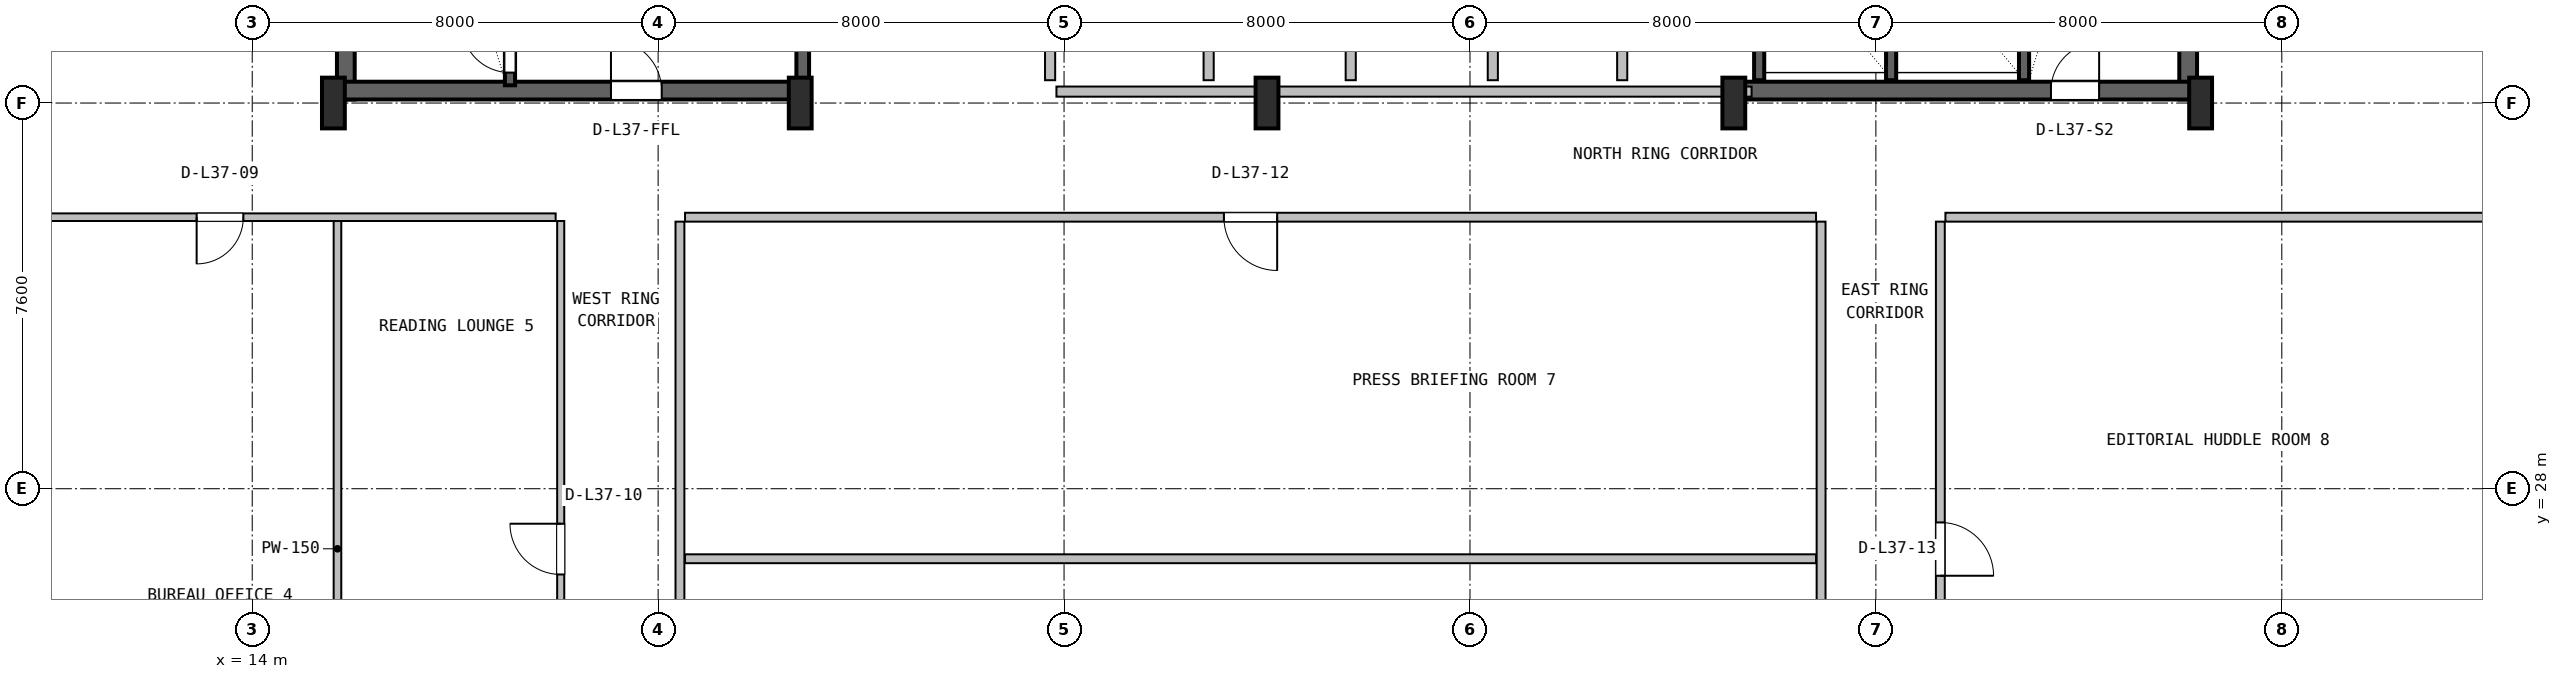
"""IFC4 building model, lengths in metres.
Left out: names, types, materials, properties, quantities, classifications, styles, units other than length and angle.
Written with IfcOpenShell. Run it as: python <this file> out.ifc"""

import sys

from ifc_helpers import new_model, si_unit, direction, frame, frame_2d, origin, origin_2d, place, context, subcontext, project, spatial, rectangle, i_section, extrude, source, transform, mapped, element, fill, save


model = new_model("IFC4")
c1 = context("Model", 3, precision=1e-05, world=origin(), true_north=direction((0.0, 1.0)))
c2 = subcontext(c1, "Body", "Model", "MODEL_VIEW")
j1 = project(units=[si_unit("LENGTHUNIT", "METRE"), si_unit("PLANEANGLEUNIT", "RADIAN")], contexts=[c1])
p1 = place(None, origin())
s1 = spatial("IfcSite", under=j1, at=p1, CompositionType="ELEMENT")
p2 = place(p1, origin())
s2 = spatial("IfcBuilding", under=s1, at=p2, CompositionType="ELEMENT")
p3 = place(p2, frame((0.0, 0.0, 153.4)))
s3 = spatial("IfcBuildingStorey", under=s2, at=p3, CompositionType="ELEMENT", Elevation=153.4)
for number, where, z_axis, x_axis in (
    (1, (15.845, 35.67, 0.0), (0.0, 0.0, 1.0), (0.0, 1.0, 0.0)),
    (2, (52.155, 35.67, 0.0), (0.0, 0.0, 1.0), (0.0, 1.0, 0.0)),
):
    element("IfcWall", number, at=place(p3, frame(where, z_axis=z_axis, x_axis=x_axis)), inside=s3, PredefinedType="SHEAR", context=c2, shape_type="SweptSolid", body=[
        extrude(rectangle(XDim=11.13, YDim=0.35, at=frame_2d((5.565, 0.0))), origin(), (0.0, 0.0, 1.0), 3.55),
    ])
p4 = place(p3, frame((15.67, 35.845, 0.0), z_axis=(0.0, 0.0, 1.0), x_axis=(1.0, 0.0, 0.0)))
e3 = element("IfcWall", 3, at=p4, inside=s3, PredefinedType="SHEAR", context=c2, shape_type="SweptSolid", body=[
    extrude(rectangle(XDim=9.13, YDim=0.35, at=frame_2d((4.565, 0.0))), origin(), (0.0, 0.0, 1.0), 3.55),
])
p5 = place(p4, frame((5.4, 0.0, 0.0)))
e4 = element("IfcOpeningElement", 4, at=p5, cuts=e3, PredefinedType="OPENING", context=c2, shape_type="SweptSolid", body=[
    extrude(rectangle(XDim=1.0, YDim=2.1, at=frame_2d((0.5, 1.05))), frame((0.0, 0.185, 0.0), z_axis=(0.0, -1.0, 0.0), x_axis=(1.0, 0.0, 0.0)), (0.0, 0.0, 1.0), 0.37),
])
p6 = place(p3, frame((43.2, 35.845, 0.0), z_axis=(0.0, 0.0, 1.0), x_axis=(1.0, 0.0, 0.0)))
e5 = element("IfcWall", 5, at=p6, inside=s3, PredefinedType="SHEAR", context=c2, shape_type="SweptSolid", body=[
    extrude(rectangle(XDim=9.13, YDim=0.35, at=frame_2d((4.565, 0.0))), origin(), (0.0, 0.0, 1.0), 3.55),
])
p7 = place(p6, frame((6.25, 0.0, 0.0)))
e6 = element("IfcOpeningElement", 6, at=p7, cuts=e5, PredefinedType="OPENING", context=c2, shape_type="SweptSolid", body=[
    extrude(rectangle(XDim=0.95, YDim=2.1, at=frame_2d((0.475, 1.05))), frame((0.0, 0.185, 0.0), z_axis=(0.0, -1.0, 0.0), x_axis=(1.0, 0.0, 0.0)), (0.0, 0.0, 1.0), 0.37),
])
m1 = source(origin(), c2, "Body", "SweptSolid", [
    extrude(i_section(OverallWidth=0.45, OverallDepth=1.0, WebThickness=0.016, FlangeThickness=0.03, FilletRadius=0.016, at=origin_2d()), origin(), (0.0, 0.0, 1.0), 3.8),
])
for number, where, z_axis, x_axis in (
    (7, (15.6, 35.6, 0.0), (0.0, 0.0, 1.0), (1.0, 0.0, 0.0)),
    (8, (24.8, 35.6, 0.0), (0.0, 0.0, 1.0), (1.0, 0.0, 0.0)),
    (9, (34.0, 35.6, 0.0), (0.0, 0.0, 1.0), (1.0, 0.0, 0.0)),
    (10, (43.2, 35.6, 0.0), (0.0, 0.0, 1.0), (1.0, 0.0, 0.0)),
    (11, (52.4, 35.6, 0.0), (0.0, 0.0, 1.0), (1.0, 0.0, 0.0)),
):
    element("IfcColumn", number, at=place(p3, frame(where, z_axis=z_axis, x_axis=x_axis)), inside=s3, PredefinedType="COLUMN", context=c2, shape_type="MappedRepresentation", body=[
        mapped(m1, transform((0.0, 0.0, 0.0), x_axis=(1.0, 0.0, 0.0), y_axis=(0.0, 1.0, 0.0), z_axis=(0.0, 0.0, 1.0), scale=1.0)),
    ])
p8 = place(p3, frame((19.08, 35.95, 0.0), z_axis=(0.0, 0.0, 1.0), x_axis=(0.0, 1.0, 0.0)))
e12 = element("IfcWall", 12, at=p8, inside=s3, PredefinedType="SHEAR", context=c2, shape_type="SweptSolid", body=[
    extrude(rectangle(XDim=9.65, YDim=0.2, at=frame_2d((4.825, 0.0))), origin(), (0.0, 0.0, 1.0), 3.55),
])
p9 = place(p8, frame((0.25, 0.0, 0.0)))
e13 = element("IfcOpeningElement", 13, at=p9, cuts=e12, PredefinedType="OPENING", context=c2, shape_type="SweptSolid", body=[
    extrude(rectangle(XDim=0.95, YDim=2.1, at=frame_2d((0.475, 1.05))), frame((0.0, 0.11, 0.0), z_axis=(0.0, -1.0, 0.0), x_axis=(1.0, 0.0, 0.0)), (0.0, 0.0, 1.0), 0.22),
])
p10 = place(p3, frame((24.85, 36.05, 0.0), z_axis=(0.0, 0.0, 1.0), x_axis=(0.0, 1.0, 0.0)))
e14 = element("IfcWall", 14, at=p10, inside=s3, PredefinedType="SHEAR", context=c2, shape_type="SweptSolid", body=[
    extrude(rectangle(XDim=10.45, YDim=0.25, at=frame_2d((5.225, 0.0))), origin(), (0.0, 0.0, 1.0), 3.55),
])
p11 = place(p3, frame((48.92, 36.05, 0.0), z_axis=(0.0, 0.0, 1.0), x_axis=(0.0, 1.0, 0.0)))
e15 = element("IfcWall", 15, at=p11, inside=s3, PredefinedType="SHEAR", context=c2, shape_type="SweptSolid", body=[
    extrude(rectangle(XDim=10.5, YDim=0.2, at=frame_2d((5.25, 0.0))), origin(), (0.0, 0.0, 1.0), 3.55),
])
for number, where, z_axis, x_axis in (
    (16, (43.7, 36.05, 0.0), (0.0, 0.0, 1.0), (0.0, 1.0, 0.0)),
    (17, (46.3, 36.05, 0.0), (0.0, 0.0, 1.0), (0.0, 1.0, 0.0)),
):
    element("IfcWall", number, at=place(p3, frame(where, z_axis=z_axis, x_axis=x_axis)), inside=s3, PredefinedType="SHEAR", context=c2, shape_type="SweptSolid", body=[
        extrude(rectangle(XDim=3.05, YDim=0.2, at=frame_2d((1.525, 0.0))), origin(), (0.0, 0.0, 1.0), 3.55),
    ])
p12 = place(p3, frame((29.85, 35.825, 0.0), z_axis=(0.0, 0.0, 1.0), x_axis=(1.0, 0.0, 0.0)))
e18 = element("IfcWall", 18, at=p12, inside=s3, PredefinedType="SOLIDWALL", context=c2, shape_type="SweptSolid", body=[
    extrude(rectangle(XDim=13.7, YDim=0.2, at=frame_2d((6.85, 0.0))), origin(), (0.0, 0.0, 1.0), 2.575),
])
for number, where, z_axis, x_axis in (
    (19, (32.85, 36.05, 0.0), (0.0, 0.0, 1.0), (0.0, 1.0, 0.0)),
    (20, (29.725, 36.05, 0.0), (0.0, 0.0, 1.0), (0.0, 1.0, 0.0)),
    (21, (35.65, 36.05, 0.0), (0.0, 0.0, 1.0), (0.0, 1.0, 0.0)),
    (22, (38.45, 36.05, 0.0), (0.0, 0.0, 1.0), (0.0, 1.0, 0.0)),
):
    element("IfcWall", number, at=place(p3, frame(where, z_axis=z_axis, x_axis=x_axis)), inside=s3, PredefinedType="PLUMBINGWALL", context=c2, shape_type="SweptSolid", body=[
        extrude(rectangle(XDim=3.1, YDim=0.2, at=frame_2d((1.55, 0.0))), origin(), (0.0, 0.0, 1.0), 3.53),
    ])
p13 = place(p3, frame((41.0, 36.05, 0.0), z_axis=(0.0, 0.0, 1.0), x_axis=(0.0, 1.0, 0.0)))
e23 = element("IfcWall", 23, at=p13, inside=s3, PredefinedType="SOLIDWALL", context=c2, shape_type="SweptSolid", body=[
    extrude(rectangle(XDim=3.1, YDim=0.2, at=frame_2d((1.55, 0.0))), origin(), (0.0, 0.0, 1.0), 3.53),
])
p14 = place(p3, frame((15.68, 20.357, 0.0), z_axis=(0.0, 0.0, 1.0), x_axis=(0.0, 1.0, 0.0)))
e24 = element("IfcWall", 24, at=p14, inside=s3, PredefinedType="PARTITIONING", context=c2, shape_type="SweptSolid", body=[
    extrude(rectangle(XDim=12.918, YDim=0.15, at=frame_2d((6.459, 0.0))), origin(), (0.0, 0.0, 1.0), 3.222),
])
p15 = place(p3, frame((7.18, 33.35, 0.0), z_axis=(0.0, 0.0, 1.0), x_axis=(1.0, 0.0, 0.0)))
e25 = element("IfcWall", 25, at=p15, inside=s3, PredefinedType="PARTITIONING", context=c2, shape_type="SweptSolid", body=[
    extrude(rectangle(XDim=12.8, YDim=0.15, at=frame_2d((6.4, 0.0))), origin(), (0.0, 0.0, 1.0), 3.108),
])
p16 = place(p15, frame((5.725, 0.0, 0.0)))
e26 = element("IfcOpeningElement", 26, at=p16, cuts=e25, PredefinedType="OPENING", context=c2, shape_type="SweptSolid", body=[
    extrude(rectangle(XDim=0.92, YDim=2.08, at=frame_2d((0.46, 1.04))), frame((0.0, 0.085, 0.0), z_axis=(0.0, -1.0, 0.0), x_axis=(1.0, 0.0, 0.0)), (0.0, 0.0, 1.0), 0.17),
])
p17 = place(p3, frame((20.08, 20.357, 0.0), z_axis=(0.0, 0.0, 1.0), x_axis=(0.0, 1.0, 0.0)))
e27 = element("IfcWall", 27, at=p17, inside=s3, PredefinedType="PARTITIONING", context=c2, shape_type="SweptSolid", body=[
    extrude(rectangle(XDim=12.918, YDim=0.14, at=frame_2d((6.459, 0.0))), origin(), (0.0, 0.0, 1.0), 3.222),
])
p18 = place(p17, frame((5.953, 0.0, 0.0)))
e28 = element("IfcOpeningElement", 28, at=p18, cuts=e27, PredefinedType="OPENING", context=c2, shape_type="SweptSolid", body=[
    extrude(rectangle(XDim=1.0, YDim=2.1, at=frame_2d((0.5, 1.05))), frame((0.0, 0.08, 0.0), z_axis=(0.0, -1.0, 0.0), x_axis=(1.0, 0.0, 0.0)), (0.0, 0.0, 1.0), 0.16),
])
p19 = place(p3, frame((44.92, 22.707, 0.0), z_axis=(0.0, 0.0, 1.0), x_axis=(0.0, 1.0, 0.0)))
e29 = element("IfcWall", 29, at=p19, inside=s3, PredefinedType="PARTITIONING", context=c2, shape_type="SweptSolid", body=[
    extrude(rectangle(XDim=10.556, YDim=0.175, at=frame_2d((5.278, 0.0))), origin(), (0.0, 0.0, 1.0), 3.222),
])
p20 = place(p3, frame((22.53, 26.62, 0.0), z_axis=(0.0, 0.0, 1.0), x_axis=(1.0, 0.0, 0.0)))
e30 = element("IfcWall", 30, at=p20, inside=s3, PredefinedType="PARTITIONING", context=c2, shape_type="SweptSolid", body=[
    extrude(rectangle(XDim=22.29, YDim=0.175, at=frame_2d((11.145, 0.0))), origin(), (0.0, 0.0, 1.0), 2.909),
])
p21 = place(p3, frame((22.43, 22.707, 0.0), z_axis=(0.0, 0.0, 1.0), x_axis=(0.0, 1.0, 0.0)))
e31 = element("IfcWall", 31, at=p21, inside=s3, PredefinedType="PARTITIONING", context=c2, shape_type="SweptSolid", body=[
    extrude(rectangle(XDim=10.556, YDim=0.175, at=frame_2d((5.278, 0.0))), origin(), (0.0, 0.0, 1.0), 3.222),
])
p22 = place(p3, frame((22.53, 33.35, 0.0), z_axis=(0.0, 0.0, 1.0), x_axis=(1.0, 0.0, 0.0)))
e32 = element("IfcWall", 32, at=p22, inside=s3, PredefinedType="PARTITIONING", context=c2, shape_type="SweptSolid", body=[
    extrude(rectangle(XDim=22.29, YDim=0.175, at=frame_2d((11.145, 0.0))), origin(), (0.0, 0.0, 1.0), 2.909),
])
p23 = place(p22, frame((10.62, 0.0, 0.0)))
e33 = element("IfcOpeningElement", 33, at=p23, cuts=e32, PredefinedType="OPENING", context=c2, shape_type="SweptSolid", body=[
    extrude(rectangle(XDim=1.05, YDim=2.1, at=frame_2d((0.525, 1.05))), frame((0.0, 0.098, 0.0), z_axis=(0.0, -1.0, 0.0), x_axis=(1.0, 0.0, 0.0)), (0.0, 0.0, 1.0), 0.195),
])
p24 = place(p3, frame((47.37, 33.35, 0.0), z_axis=(0.0, 0.0, 1.0), x_axis=(1.0, 0.0, 0.0)))
e34 = element("IfcWall", 34, at=p24, inside=s3, PredefinedType="PARTITIONING", context=c2, shape_type="SweptSolid", body=[
    extrude(rectangle(XDim=13.45, YDim=0.175, at=frame_2d((6.725, 0.0))), origin(), (0.0, 0.0, 1.0), 3.108),
])
p25 = place(p3, frame((47.27, 20.357, 0.0), z_axis=(0.0, 0.0, 1.0), x_axis=(0.0, 1.0, 0.0)))
e35 = element("IfcWall", 35, at=p25, inside=s3, PredefinedType="PARTITIONING", context=c2, shape_type="SweptSolid", body=[
    extrude(rectangle(XDim=12.906, YDim=0.175, at=frame_2d((6.453, 0.0))), origin(), (0.0, 0.0, 1.0), 3.222),
])
p26 = place(p25, frame((5.928, 0.0, 0.0)))
e36 = element("IfcOpeningElement", 36, at=p26, cuts=e35, PredefinedType="OPENING", context=c2, shape_type="SweptSolid", body=[
    extrude(rectangle(XDim=1.05, YDim=2.1, at=frame_2d((0.525, 1.05))), frame((0.0, 0.098, 0.0), z_axis=(0.0, -1.0, 0.0), x_axis=(1.0, 0.0, 0.0)), (0.0, 0.0, 1.0), 0.195),
])
m2 = source(origin(), c2, "Body", "SweptSolid", [
    extrude(rectangle(XDim=0.95, YDim=2.1, at=frame_2d((0.475, 1.05))), frame((0.0, 0.025, 0.0), z_axis=(0.0, -1.0, 0.0), x_axis=(1.0, 0.0, 0.0)), (0.0, 0.0, 1.0), 0.05),
])
p27 = place(p9, origin())
e37 = element("IfcDoor", 37, at=p27, inside=s3, OperationType="SINGLE_SWING_RIGHT", PredefinedType="DOOR", context=c2, shape_type="MappedRepresentation", body=[
    mapped(m2, transform((0.0, 0.0, 0.0), x_axis=(1.0, 0.0, 0.0), y_axis=(0.0, 1.0, 0.0), z_axis=(0.0, 0.0, 1.0), scale=1.0)),
])
fill(e13, e37)
m3 = source(origin(), c2, "Body", "SweptSolid", [
    extrude(rectangle(XDim=1.0, YDim=2.1, at=frame_2d((0.5, 1.05))), frame((0.0, 0.025, 0.0), z_axis=(0.0, -1.0, 0.0), x_axis=(1.0, 0.0, 0.0)), (0.0, 0.0, 1.0), 0.05),
])
p28 = place(p5, origin())
e38 = element("IfcDoor", 38, at=p28, inside=s3, OperationType="SINGLE_SWING_LEFT", PredefinedType="DOOR", context=c2, shape_type="MappedRepresentation", body=[
    mapped(m3, transform((0.0, 0.0, 0.0), x_axis=(1.0, 0.0, 0.0), y_axis=(0.0, 1.0, 0.0), z_axis=(0.0, 0.0, 1.0), scale=1.0)),
])
fill(e4, e38)
p29 = place(p7, origin())
e39 = element("IfcDoor", 39, at=p29, inside=s3, OperationType="SINGLE_SWING_RIGHT", PredefinedType="DOOR", context=c2, shape_type="MappedRepresentation", body=[
    mapped(m2, transform((0.0, 0.0, 0.0), x_axis=(1.0, 0.0, 0.0), y_axis=(0.0, 1.0, 0.0), z_axis=(0.0, 0.0, 1.0), scale=1.0)),
])
fill(e6, e39)
m4 = source(origin(), c2, "Body", "SweptSolid", [
    extrude(rectangle(XDim=0.92, YDim=2.08, at=frame_2d((0.46, 1.04))), frame((0.0, 0.025, 0.0), z_axis=(0.0, -1.0, 0.0), x_axis=(1.0, 0.0, 0.0)), (0.0, 0.0, 1.0), 0.05),
])
p30 = place(p16, frame((0.92, 0.0, 0.0), z_axis=(0.0, 0.0, 1.0), x_axis=(-1.0, 0.0, 0.0)))
e40 = element("IfcDoor", 40, at=p30, inside=s3, OperationType="SINGLE_SWING_LEFT", PredefinedType="DOOR", context=c2, shape_type="MappedRepresentation", body=[
    mapped(m4, transform((0.0, 0.0, 0.0), x_axis=(1.0, 0.0, 0.0), y_axis=(0.0, 1.0, 0.0), z_axis=(0.0, 0.0, 1.0), scale=1.0)),
])
fill(e26, e40)
m5 = source(origin(), c2, "Body", "SweptSolid", [
    extrude(rectangle(XDim=1.0, YDim=2.1, at=frame_2d((0.5, 1.05))), frame((0.0, 0.025, 0.0), z_axis=(0.0, -1.0, 0.0), x_axis=(1.0, 0.0, 0.0)), (0.0, 0.0, 1.0), 0.05),
])
p31 = place(p18, origin())
e41 = element("IfcDoor", 41, at=p31, inside=s3, OperationType="SINGLE_SWING_RIGHT", PredefinedType="DOOR", context=c2, shape_type="MappedRepresentation", body=[
    mapped(m5, transform((0.0, 0.0, 0.0), x_axis=(1.0, 0.0, 0.0), y_axis=(0.0, 1.0, 0.0), z_axis=(0.0, 0.0, 1.0), scale=1.0)),
])
fill(e28, e41)
m6 = source(origin(), c2, "Body", "SweptSolid", [
    extrude(rectangle(XDim=1.05, YDim=2.1, at=frame_2d((0.525, 1.05))), frame((0.0, 0.025, 0.0), z_axis=(0.0, -1.0, 0.0), x_axis=(1.0, 0.0, 0.0)), (0.0, 0.0, 1.0), 0.05),
])
p32 = place(p23, frame((1.05, 0.0, 0.0), z_axis=(0.0, 0.0, 1.0), x_axis=(-1.0, 0.0, 0.0)))
e42 = element("IfcDoor", 42, at=p32, inside=s3, OperationType="SINGLE_SWING_RIGHT", PredefinedType="DOOR", context=c2, shape_type="MappedRepresentation", body=[
    mapped(m6, transform((0.0, 0.0, 0.0), x_axis=(1.0, 0.0, 0.0), y_axis=(0.0, 1.0, 0.0), z_axis=(0.0, 0.0, 1.0), scale=1.0)),
])
fill(e33, e42)
p33 = place(p26, frame((1.05, 0.0, 0.0), z_axis=(0.0, 0.0, 1.0), x_axis=(-1.0, 0.0, 0.0)))
e43 = element("IfcDoor", 43, at=p33, inside=s3, OperationType="SINGLE_SWING_LEFT", PredefinedType="DOOR", context=c2, shape_type="MappedRepresentation", body=[
    mapped(m6, transform((0.0, 0.0, 0.0), x_axis=(1.0, 0.0, 0.0), y_axis=(0.0, 1.0, 0.0), z_axis=(0.0, 0.0, 1.0), scale=1.0)),
])
fill(e36, e43)
save(model, sys.argv[1])
